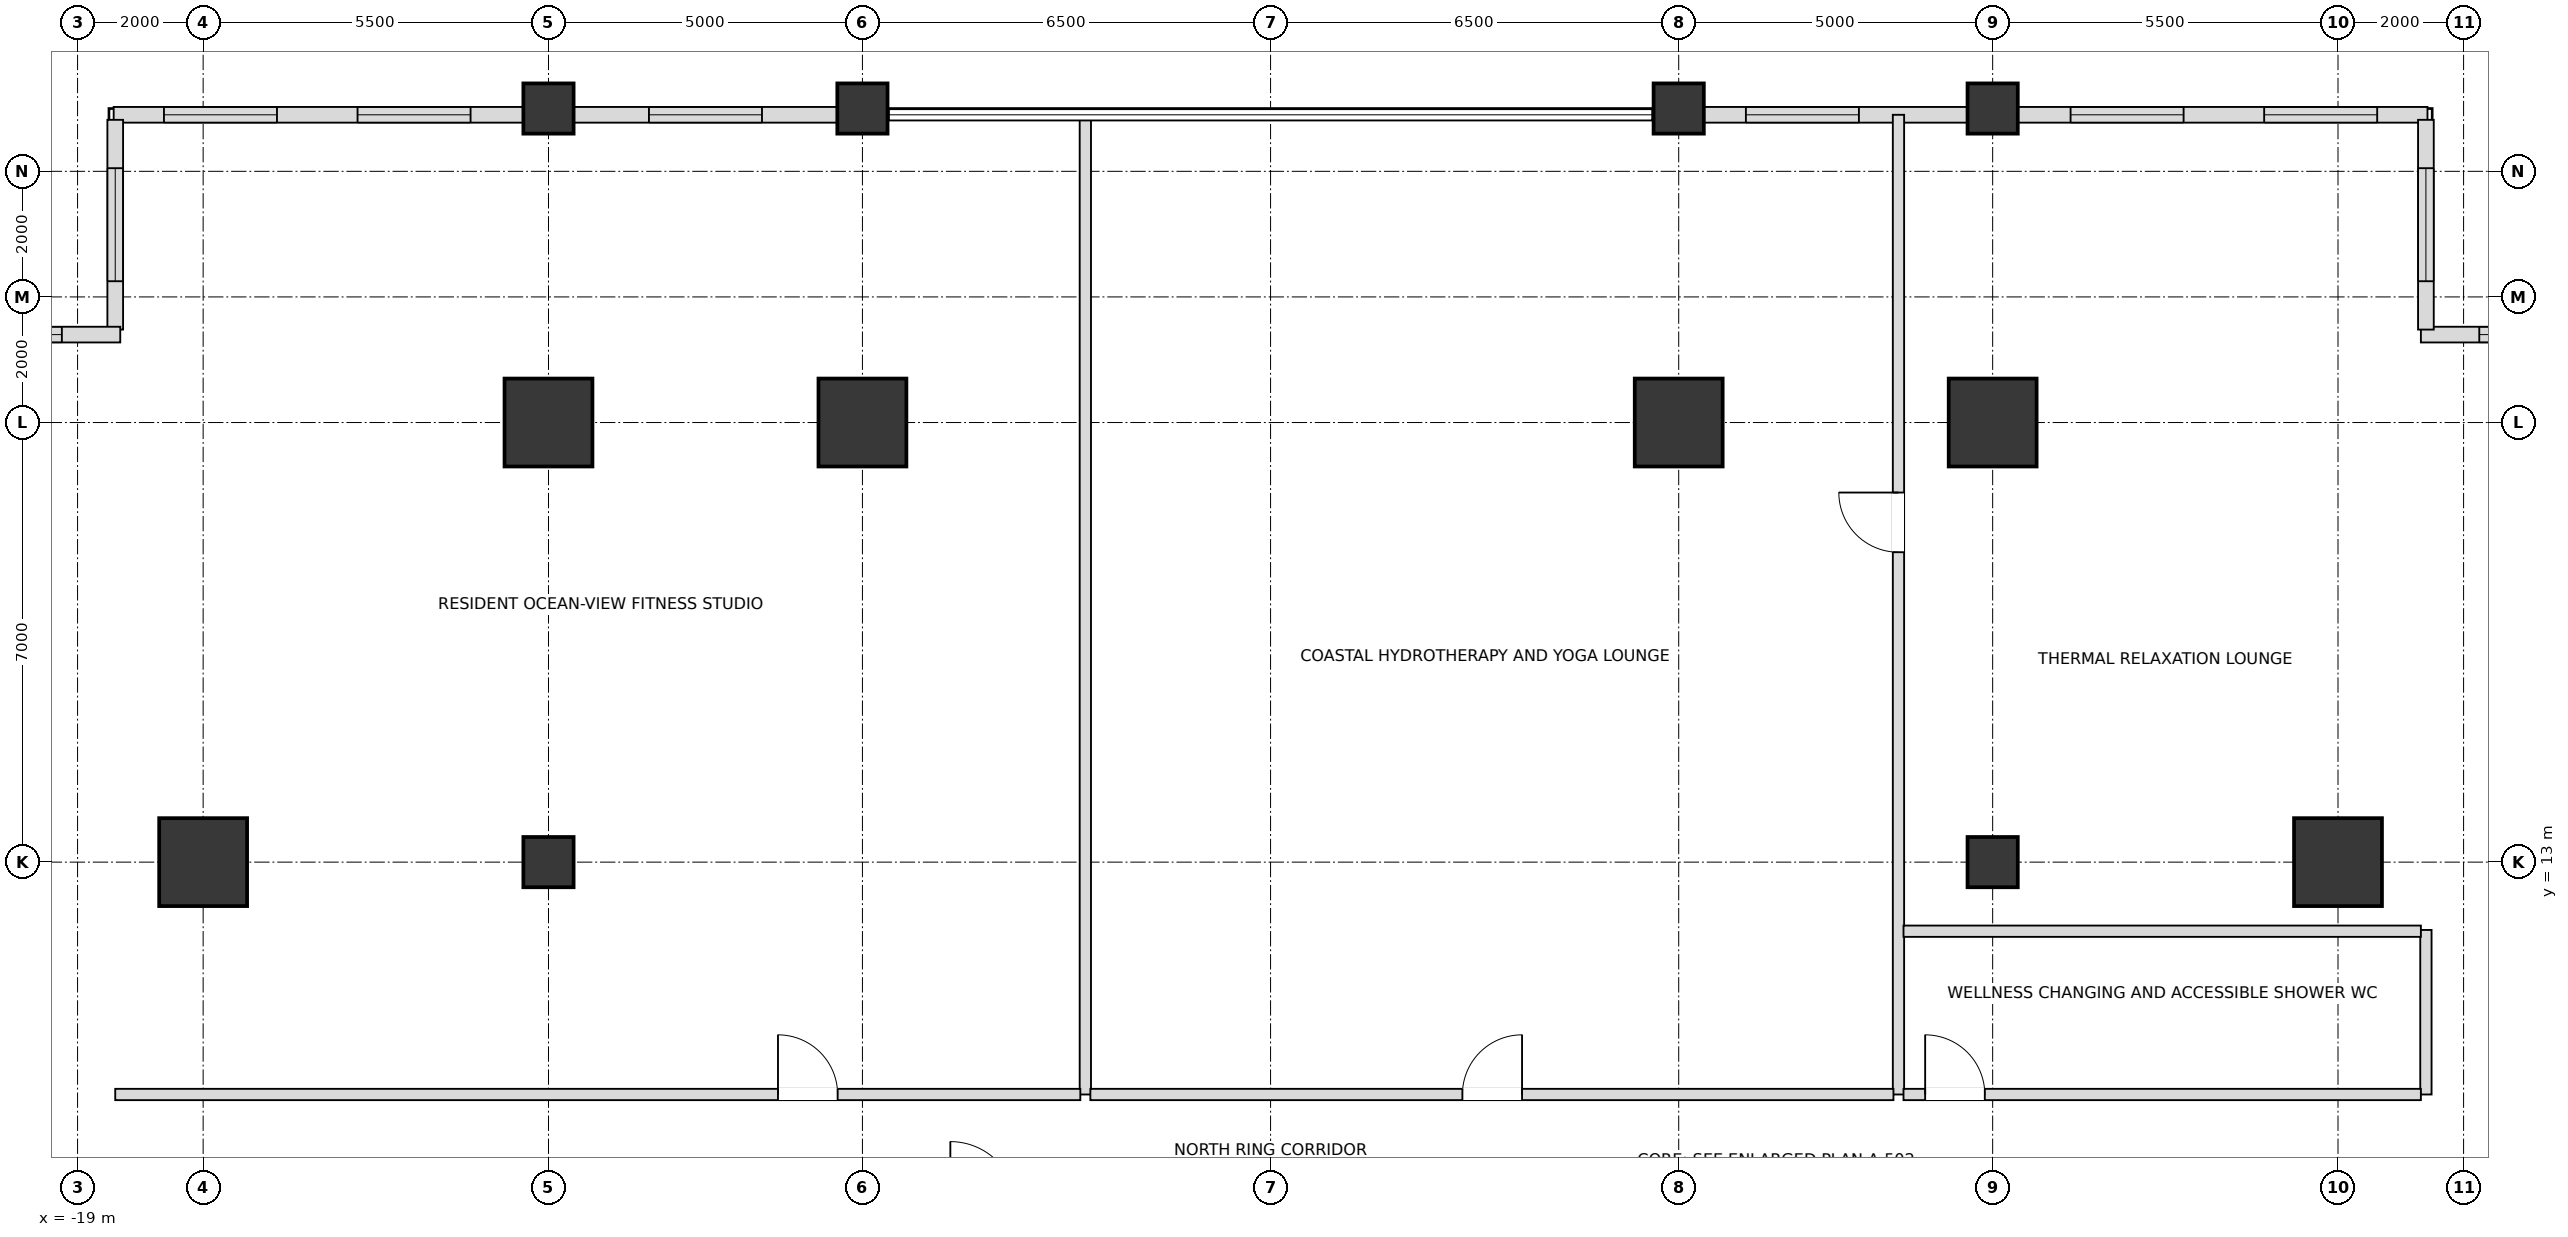
"""IFC4 building model, lengths in metres.
Left out: names, types, materials, properties, quantities, classifications, styles, units other than length and angle.
Written with IfcOpenShell. Run it as: python <this file> out.ifc"""

import sys

from ifc_helpers import new_model, si_unit, direction, frame, frame_2d, origin, origin_2d, place, context, subcontext, project, spatial, rectangle, extrude, element, fill, save


model = new_model("IFC4")
c1 = context("Model", 3, precision=1e-05, world=origin(), true_north=direction((0.0, 1.0)))
c2 = subcontext(c1, "Body", "Model", "MODEL_VIEW")
j1 = project(units=[si_unit("LENGTHUNIT", "METRE"), si_unit("PLANEANGLEUNIT", "RADIAN")], contexts=[c1])
p1 = place(None, origin())
s1 = spatial("IfcSite", under=j1, at=p1, CompositionType="ELEMENT")
p2 = place(p1, origin())
s2 = spatial("IfcBuilding", under=s1, at=p2, CompositionType="ELEMENT")
p3 = place(p2, frame((0.0, 0.0, 36.0)))
s3 = spatial("IfcBuildingStorey", under=s2, at=p3, CompositionType="ELEMENT", Elevation=36.0)
for number, where, z_axis, x_axis in (
    (1, (17.0, 13.0, 0.0), (0.0, 0.0, 1.0), (1.0, 0.0, 0.0)),
    (2, (11.5, 20.0, 0.0), (0.0, 0.0, 1.0), (1.0, 0.0, 0.0)),
    (3, (6.5, 20.0, 0.0), (0.0, 0.0, 1.0), (1.0, 0.0, 0.0)),
    (4, (-6.5, 20.0, 0.0), (0.0, 0.0, 1.0), (1.0, 0.0, 0.0)),
    (5, (-11.5, 20.0, 0.0), (0.0, 0.0, 1.0), (1.0, 0.0, 0.0)),
    (6, (-17.0, 13.0, 0.0), (0.0, 0.0, 1.0), (1.0, 0.0, 0.0)),
):
    element("IfcColumn", number, at=place(p3, frame(where, z_axis=z_axis, x_axis=x_axis)), inside=s3, PredefinedType="USERDEFINED", context=c2, shape_type="SweptSolid", body=[
        extrude(rectangle(XDim=1.4, YDim=1.4, at=origin_2d()), origin(), (0.0, 0.0, 1.0), 3.6),
    ])
for number, where, z_axis, x_axis in (
    (7, (-11.5, 13.0, 0.0), (0.0, 0.0, 1.0), (1.0, 0.0, 0.0)),
    (8, (11.5, 13.0, 0.0), (0.0, 0.0, 1.0), (1.0, 0.0, 0.0)),
    (9, (-11.5, 25.0, 0.0), (0.0, 0.0, 1.0), (1.0, 0.0, 0.0)),
    (10, (-6.5, 25.0, 0.0), (0.0, 0.0, 1.0), (1.0, 0.0, 0.0)),
    (11, (6.5, 25.0, 0.0), (0.0, 0.0, 1.0), (1.0, 0.0, 0.0)),
    (12, (11.5, 25.0, 0.0), (0.0, 0.0, 1.0), (1.0, 0.0, 0.0)),
):
    element("IfcColumn", number, at=place(p3, frame(where, z_axis=z_axis, x_axis=x_axis)), inside=s3, PredefinedType="COLUMN", context=c2, shape_type="SweptSolid", body=[
        extrude(rectangle(XDim=0.8, YDim=0.8, at=origin_2d()), origin(), (0.0, 0.0, 1.0), 3.6),
    ])
p4 = place(p3, frame((18.425, 24.9, 0.0), z_axis=(0.0, 0.0, 1.0), x_axis=(-1.0, 0.0, 0.0)))
e13 = element("IfcWall", 13, at=p4, inside=s3, PredefinedType="SOLIDWALL", context=c2, shape_type="SweptSolid", body=[
    extrude(rectangle(XDim=6.53, YDim=0.25, at=frame_2d((3.265, 0.0))), origin(), (0.0, 0.0, 1.0), 2.736),
])
p5 = place(p4, frame((0.801, 0.0, 0.72)))
e14 = element("IfcOpeningElement", 14, at=p5, cuts=e13, PredefinedType="OPENING", context=c2, shape_type="SweptSolid", body=[
    extrude(rectangle(XDim=1.8, YDim=1.68, at=frame_2d((0.9, 0.84))), frame((0.0, 0.135, 0.0), z_axis=(0.0, -1.0, 0.0), x_axis=(1.0, 0.0, 0.0)), (0.0, 0.0, 1.0), 0.27),
])
p6 = place(p4, frame((3.884, 0.0, 0.72)))
e15 = element("IfcOpeningElement", 15, at=p6, cuts=e13, PredefinedType="OPENING", context=c2, shape_type="SweptSolid", body=[
    extrude(rectangle(XDim=1.8, YDim=1.68, at=frame_2d((0.9, 0.84))), frame((0.0, 0.135, 0.0), z_axis=(0.0, -1.0, 0.0), x_axis=(1.0, 0.0, 0.0)), (0.0, 0.0, 1.0), 0.27),
])
p7 = place(p3, frame((11.105, 24.9, 0.0), z_axis=(0.0, 0.0, 1.0), x_axis=(-1.0, 0.0, 0.0)))
e16 = element("IfcWall", 16, at=p7, inside=s3, PredefinedType="SOLIDWALL", context=c2, shape_type="SweptSolid", body=[
    extrude(rectangle(XDim=4.21, YDim=0.25, at=frame_2d((2.105, 0.0))), origin(), (0.0, 0.0, 1.0), 2.736),
])
p8 = place(p7, frame((1.735, 0.0, 0.72)))
e17 = element("IfcOpeningElement", 17, at=p8, cuts=e16, PredefinedType="OPENING", context=c2, shape_type="SweptSolid", body=[
    extrude(rectangle(XDim=1.8, YDim=1.68, at=frame_2d((0.9, 0.84))), frame((0.0, 0.135, 0.0), z_axis=(0.0, -1.0, 0.0), x_axis=(1.0, 0.0, 0.0)), (0.0, 0.0, 1.0), 0.27),
])
p9 = place(p3, frame((-6.895, 24.9, 0.0), z_axis=(0.0, 0.0, 1.0), x_axis=(-1.0, 0.0, 0.0)))
e18 = element("IfcWall", 18, at=p9, inside=s3, PredefinedType="SOLIDWALL", context=c2, shape_type="SweptSolid", body=[
    extrude(rectangle(XDim=4.21, YDim=0.25, at=frame_2d((2.105, 0.0))), origin(), (0.0, 0.0, 1.0), 2.736),
])
p10 = place(p9, frame((1.205, 0.0, 0.72)))
e19 = element("IfcOpeningElement", 19, at=p10, cuts=e18, PredefinedType="OPENING", context=c2, shape_type="SweptSolid", body=[
    extrude(rectangle(XDim=1.8, YDim=1.68, at=frame_2d((0.9, 0.84))), frame((0.0, 0.135, 0.0), z_axis=(0.0, -1.0, 0.0), x_axis=(1.0, 0.0, 0.0)), (0.0, 0.0, 1.0), 0.27),
])
p11 = place(p3, frame((-11.895, 24.9, 0.0), z_axis=(0.0, 0.0, 1.0), x_axis=(-1.0, 0.0, 0.0)))
e20 = element("IfcWall", 20, at=p11, inside=s3, PredefinedType="SOLIDWALL", context=c2, shape_type="SweptSolid", body=[
    extrude(rectangle(XDim=6.53, YDim=0.25, at=frame_2d((3.265, 0.0))), origin(), (0.0, 0.0, 1.0), 2.736),
])
p12 = place(p11, frame((0.846, 0.0, 0.72)))
e21 = element("IfcOpeningElement", 21, at=p12, cuts=e20, PredefinedType="OPENING", context=c2, shape_type="SweptSolid", body=[
    extrude(rectangle(XDim=1.8, YDim=1.68, at=frame_2d((0.9, 0.84))), frame((0.0, 0.135, 0.0), z_axis=(0.0, -1.0, 0.0), x_axis=(1.0, 0.0, 0.0)), (0.0, 0.0, 1.0), 0.27),
])
p13 = place(p11, frame((3.929, 0.0, 0.72)))
e22 = element("IfcOpeningElement", 22, at=p13, cuts=e20, PredefinedType="OPENING", context=c2, shape_type="SweptSolid", body=[
    extrude(rectangle(XDim=1.8, YDim=1.68, at=frame_2d((0.9, 0.84))), frame((0.0, 0.135, 0.0), z_axis=(0.0, -1.0, 0.0), x_axis=(1.0, 0.0, 0.0)), (0.0, 0.0, 1.0), 0.27),
])
p14 = place(p3, frame((21.98, 21.4, 0.0), z_axis=(0.0, 0.0, 1.0), x_axis=(-1.0, 0.0, 0.0)))
e23 = element("IfcWall", 23, at=p14, inside=s3, PredefinedType="SOLIDWALL", context=c2, shape_type="SweptSolid", body=[
    extrude(rectangle(XDim=3.66, YDim=0.25, at=frame_2d((1.83, 0.0))), origin(), (0.0, 0.0, 1.0), 2.736),
])
p15 = place(p14, frame((0.93, 0.0, 0.72)))
e24 = element("IfcOpeningElement", 24, at=p15, cuts=e23, PredefinedType="OPENING", context=c2, shape_type="SweptSolid", body=[
    extrude(rectangle(XDim=1.8, YDim=1.68, at=frame_2d((0.9, 0.84))), frame((0.0, 0.135, 0.0), z_axis=(0.0, -1.0, 0.0), x_axis=(1.0, 0.0, 0.0)), (0.0, 0.0, 1.0), 0.27),
])
p16 = place(p3, frame((18.4, 21.48, 0.0), z_axis=(0.0, 0.0, 1.0), x_axis=(0.0, 1.0, 0.0)))
e25 = element("IfcWall", 25, at=p16, inside=s3, PredefinedType="SOLIDWALL", context=c2, shape_type="SweptSolid", body=[
    extrude(rectangle(XDim=3.34, YDim=0.25, at=frame_2d((1.67, 0.0))), origin(), (0.0, 0.0, 1.0), 2.736),
])
p17 = place(p16, frame((0.77, 0.0, 0.72)))
e26 = element("IfcOpeningElement", 26, at=p17, cuts=e25, PredefinedType="OPENING", context=c2, shape_type="SweptSolid", body=[
    extrude(rectangle(XDim=1.8, YDim=1.68, at=frame_2d((0.9, 0.84))), frame((0.0, 0.135, 0.0), z_axis=(0.0, -1.0, 0.0), x_axis=(1.0, 0.0, 0.0)), (0.0, 0.0, 1.0), 0.27),
])
p18 = place(p3, frame((-18.4, 24.82, 0.0), z_axis=(0.0, 0.0, 1.0), x_axis=(0.0, -1.0, 0.0)))
e27 = element("IfcWall", 27, at=p18, inside=s3, PredefinedType="SOLIDWALL", context=c2, shape_type="SweptSolid", body=[
    extrude(rectangle(XDim=3.34, YDim=0.25, at=frame_2d((1.67, 0.0))), origin(), (0.0, 0.0, 1.0), 2.736),
])
p19 = place(p18, frame((0.77, 0.0, 0.72)))
e28 = element("IfcOpeningElement", 28, at=p19, cuts=e27, PredefinedType="OPENING", context=c2, shape_type="SweptSolid", body=[
    extrude(rectangle(XDim=1.8, YDim=1.68, at=frame_2d((0.9, 0.84))), frame((0.0, 0.135, 0.0), z_axis=(0.0, -1.0, 0.0), x_axis=(1.0, 0.0, 0.0)), (0.0, 0.0, 1.0), 0.27),
])
p20 = place(p3, frame((-18.32, 21.4, 0.0), z_axis=(0.0, 0.0, 1.0), x_axis=(-1.0, 0.0, 0.0)))
e29 = element("IfcWall", 29, at=p20, inside=s3, PredefinedType="SOLIDWALL", context=c2, shape_type="SweptSolid", body=[
    extrude(rectangle(XDim=3.66, YDim=0.25, at=frame_2d((1.83, 0.0))), origin(), (0.0, 0.0, 1.0), 2.736),
])
p21 = place(p20, frame((0.93, 0.0, 0.72)))
e30 = element("IfcOpeningElement", 30, at=p21, cuts=e29, PredefinedType="OPENING", context=c2, shape_type="SweptSolid", body=[
    extrude(rectangle(XDim=1.8, YDim=1.68, at=frame_2d((0.9, 0.84))), frame((0.0, 0.135, 0.0), z_axis=(0.0, -1.0, 0.0), x_axis=(1.0, 0.0, 0.0)), (0.0, 0.0, 1.0), 0.27),
])
p22 = place(p3, frame((-2.95, 9.3, 0.0), z_axis=(0.0, 0.0, 1.0), x_axis=(0.0, 1.0, 0.0)))
e31 = element("IfcWall", 31, at=p22, inside=s3, PredefinedType="PARTITIONING", context=c2, shape_type="SweptSolid", body=[
    extrude(rectangle(XDim=15.6, YDim=0.18, at=frame_2d((7.8, 0.0))), origin(), (0.0, 0.0, 1.0), 2.816),
])
p23 = place(p3, frame((10.0, 9.3, 0.0), z_axis=(0.0, 0.0, 1.0), x_axis=(0.0, 1.0, 0.0)))
e32 = element("IfcWall", 32, at=p23, inside=s3, PredefinedType="PARTITIONING", context=c2, shape_type="SweptSolid", body=[
    extrude(rectangle(XDim=15.6, YDim=0.18, at=frame_2d((7.8, 0.0))), origin(), (0.0, 0.0, 1.0), 2.816),
])
p24 = place(p23, frame((8.635, 0.0, 0.0)))
e33 = element("IfcOpeningElement", 33, at=p24, cuts=e32, PredefinedType="OPENING", context=c2, shape_type="SweptSolid", body=[
    extrude(rectangle(XDim=0.95, YDim=2.15, at=frame_2d((0.475, 1.075))), frame((0.0, 0.1, 0.0), z_axis=(0.0, -1.0, 0.0), x_axis=(1.0, 0.0, 0.0)), (0.0, 0.0, 1.0), 0.2),
])
p25 = place(p3, frame((18.4, 9.3, 0.0), z_axis=(0.0, 0.0, 1.0), x_axis=(0.0, 1.0, 0.0)))
e34 = element("IfcWall", 34, at=p25, inside=s3, PredefinedType="PARTITIONING", context=c2, shape_type="SweptSolid", body=[
    extrude(rectangle(XDim=2.62, YDim=0.18, at=frame_2d((1.31, 0.0))), origin(), (0.0, 0.0, 1.0), 3.38),
])
p26 = place(p3, frame((-18.4, 9.3, 0.0), z_axis=(0.0, 0.0, 1.0), x_axis=(1.0, 0.0, 0.0)))
e35 = element("IfcWall", 35, at=p26, inside=s3, PredefinedType="PARTITIONING", context=c2, shape_type="SweptSolid", body=[
    extrude(rectangle(XDim=15.37, YDim=0.18, at=frame_2d((7.685, 0.0))), origin(), (0.0, 0.0, 1.0), 2.816),
])
p27 = place(p26, frame((10.555, 0.0, 0.0)))
e36 = element("IfcOpeningElement", 36, at=p27, cuts=e35, PredefinedType="OPENING", context=c2, shape_type="SweptSolid", body=[
    extrude(rectangle(XDim=0.95, YDim=2.15, at=frame_2d((0.475, 1.075))), frame((0.0, 0.1, 0.0), z_axis=(0.0, -1.0, 0.0), x_axis=(1.0, 0.0, 0.0)), (0.0, 0.0, 1.0), 0.2),
])
p28 = place(p3, frame((-2.87, 9.3, 0.0), z_axis=(0.0, 0.0, 1.0), x_axis=(1.0, 0.0, 0.0)))
e37 = element("IfcWall", 37, at=p28, inside=s3, PredefinedType="PARTITIONING", context=c2, shape_type="SweptSolid", body=[
    extrude(rectangle(XDim=12.79, YDim=0.18, at=frame_2d((6.395, 0.0))), origin(), (0.0, 0.0, 1.0), 2.816),
])
p29 = place(p28, frame((5.925, 0.0, 0.0)))
e38 = element("IfcOpeningElement", 38, at=p29, cuts=e37, PredefinedType="OPENING", context=c2, shape_type="SweptSolid", body=[
    extrude(rectangle(XDim=0.95, YDim=2.15, at=frame_2d((0.475, 1.075))), frame((0.0, 0.1, 0.0), z_axis=(0.0, -1.0, 0.0), x_axis=(1.0, 0.0, 0.0)), (0.0, 0.0, 1.0), 0.2),
])
p30 = place(p3, frame((10.08, 9.3, 0.0), z_axis=(0.0, 0.0, 1.0), x_axis=(1.0, 0.0, 0.0)))
e39 = element("IfcWall", 39, at=p30, inside=s3, PredefinedType="PARTITIONING", context=c2, shape_type="SweptSolid", body=[
    extrude(rectangle(XDim=8.24, YDim=0.18, at=frame_2d((4.12, 0.0))), origin(), (0.0, 0.0, 1.0), 2.816),
])
p31 = place(p30, frame((0.345, 0.0, 0.0)))
e40 = element("IfcOpeningElement", 40, at=p31, cuts=e39, PredefinedType="OPENING", context=c2, shape_type="SweptSolid", body=[
    extrude(rectangle(XDim=0.95, YDim=2.15, at=frame_2d((0.475, 1.075))), frame((0.0, 0.1, 0.0), z_axis=(0.0, -1.0, 0.0), x_axis=(1.0, 0.0, 0.0)), (0.0, 0.0, 1.0), 0.2),
])
p32 = place(p3, frame((10.08, 11.9, 0.0), z_axis=(0.0, 0.0, 1.0), x_axis=(1.0, 0.0, 0.0)))
e41 = element("IfcWall", 41, at=p32, inside=s3, PredefinedType="PARTITIONING", context=c2, shape_type="SweptSolid", body=[
    extrude(rectangle(XDim=8.24, YDim=0.18, at=frame_2d((4.12, 0.0))), origin(), (0.0, 0.0, 1.0), 2.816),
])
p33 = place(p5, origin())
e42 = element("IfcWindow", 42, at=p33, inside=s3, PartitioningType="SINGLE_PANEL", PredefinedType="WINDOW", context=c2, shape_type="SweptSolid", body=[
    extrude(rectangle(XDim=1.8, YDim=1.68, at=frame_2d((0.9, 0.84))), frame((0.0, 0.03, 0.0), z_axis=(0.0, -1.0, 0.0), x_axis=(1.0, 0.0, 0.0)), (0.0, 0.0, 1.0), 0.06),
])
fill(e14, e42)
p34 = place(p6, origin())
e43 = element("IfcWindow", 43, at=p34, inside=s3, PartitioningType="SINGLE_PANEL", PredefinedType="WINDOW", context=c2, shape_type="SweptSolid", body=[
    extrude(rectangle(XDim=1.8, YDim=1.68, at=frame_2d((0.9, 0.84))), frame((0.0, 0.03, 0.0), z_axis=(0.0, -1.0, 0.0), x_axis=(1.0, 0.0, 0.0)), (0.0, 0.0, 1.0), 0.06),
])
fill(e15, e43)
p35 = place(p8, origin())
e44 = element("IfcWindow", 44, at=p35, inside=s3, PartitioningType="SINGLE_PANEL", PredefinedType="WINDOW", context=c2, shape_type="SweptSolid", body=[
    extrude(rectangle(XDim=1.8, YDim=1.68, at=frame_2d((0.9, 0.84))), frame((0.0, 0.03, 0.0), z_axis=(0.0, -1.0, 0.0), x_axis=(1.0, 0.0, 0.0)), (0.0, 0.0, 1.0), 0.06),
])
fill(e17, e44)
p36 = place(p10, origin())
e45 = element("IfcWindow", 45, at=p36, inside=s3, PartitioningType="SINGLE_PANEL", PredefinedType="WINDOW", context=c2, shape_type="SweptSolid", body=[
    extrude(rectangle(XDim=1.8, YDim=1.68, at=frame_2d((0.9, 0.84))), frame((0.0, 0.03, 0.0), z_axis=(0.0, -1.0, 0.0), x_axis=(1.0, 0.0, 0.0)), (0.0, 0.0, 1.0), 0.06),
])
fill(e19, e45)
p37 = place(p12, origin())
e46 = element("IfcWindow", 46, at=p37, inside=s3, PartitioningType="SINGLE_PANEL", PredefinedType="WINDOW", context=c2, shape_type="SweptSolid", body=[
    extrude(rectangle(XDim=1.8, YDim=1.68, at=frame_2d((0.9, 0.84))), frame((0.0, 0.03, 0.0), z_axis=(0.0, -1.0, 0.0), x_axis=(1.0, 0.0, 0.0)), (0.0, 0.0, 1.0), 0.06),
])
fill(e21, e46)
p38 = place(p13, origin())
e47 = element("IfcWindow", 47, at=p38, inside=s3, PartitioningType="SINGLE_PANEL", PredefinedType="WINDOW", context=c2, shape_type="SweptSolid", body=[
    extrude(rectangle(XDim=1.8, YDim=1.68, at=frame_2d((0.9, 0.84))), frame((0.0, 0.03, 0.0), z_axis=(0.0, -1.0, 0.0), x_axis=(1.0, 0.0, 0.0)), (0.0, 0.0, 1.0), 0.06),
])
fill(e22, e47)
p39 = place(p15, origin())
e48 = element("IfcWindow", 48, at=p39, inside=s3, PartitioningType="SINGLE_PANEL", PredefinedType="WINDOW", context=c2, shape_type="SweptSolid", body=[
    extrude(rectangle(XDim=1.8, YDim=1.68, at=frame_2d((0.9, 0.84))), frame((0.0, 0.03, 0.0), z_axis=(0.0, -1.0, 0.0), x_axis=(1.0, 0.0, 0.0)), (0.0, 0.0, 1.0), 0.06),
])
fill(e24, e48)
p40 = place(p17, origin())
e49 = element("IfcWindow", 49, at=p40, inside=s3, PartitioningType="SINGLE_PANEL", PredefinedType="WINDOW", context=c2, shape_type="SweptSolid", body=[
    extrude(rectangle(XDim=1.8, YDim=1.68, at=frame_2d((0.9, 0.84))), frame((0.0, 0.03, 0.0), z_axis=(0.0, -1.0, 0.0), x_axis=(1.0, 0.0, 0.0)), (0.0, 0.0, 1.0), 0.06),
])
fill(e26, e49)
p41 = place(p19, origin())
e50 = element("IfcWindow", 50, at=p41, inside=s3, PartitioningType="SINGLE_PANEL", PredefinedType="WINDOW", context=c2, shape_type="SweptSolid", body=[
    extrude(rectangle(XDim=1.8, YDim=1.68, at=frame_2d((0.9, 0.84))), frame((0.0, 0.03, 0.0), z_axis=(0.0, -1.0, 0.0), x_axis=(1.0, 0.0, 0.0)), (0.0, 0.0, 1.0), 0.06),
])
fill(e28, e50)
p42 = place(p21, origin())
e51 = element("IfcWindow", 51, at=p42, inside=s3, PartitioningType="SINGLE_PANEL", PredefinedType="WINDOW", context=c2, shape_type="SweptSolid", body=[
    extrude(rectangle(XDim=1.8, YDim=1.68, at=frame_2d((0.9, 0.84))), frame((0.0, 0.03, 0.0), z_axis=(0.0, -1.0, 0.0), x_axis=(1.0, 0.0, 0.0)), (0.0, 0.0, 1.0), 0.06),
])
fill(e30, e51)
p43 = place(p31, origin())
e52 = element("IfcDoor", 52, at=p43, inside=s3, OperationType="SINGLE_SWING_LEFT", PredefinedType="DOOR", context=c2, shape_type="SweptSolid", body=[
    extrude(rectangle(XDim=0.95, YDim=2.15, at=frame_2d((0.475, 1.075))), frame((0.0, 0.025, 0.0), z_axis=(0.0, -1.0, 0.0), x_axis=(1.0, 0.0, 0.0)), (0.0, 0.0, 1.0), 0.05),
])
fill(e40, e52)
p44 = place(p24, origin())
e53 = element("IfcDoor", 53, at=p44, inside=s3, OperationType="SINGLE_SWING_RIGHT", PredefinedType="DOOR", context=c2, shape_type="SweptSolid", body=[
    extrude(rectangle(XDim=0.95, YDim=2.15, at=frame_2d((0.475, 1.075))), frame((0.0, 0.025, 0.0), z_axis=(0.0, -1.0, 0.0), x_axis=(1.0, 0.0, 0.0)), (0.0, 0.0, 1.0), 0.05),
])
fill(e33, e53)
p45 = place(p27, origin())
e54 = element("IfcDoor", 54, at=p45, inside=s3, OperationType="SINGLE_SWING_LEFT", PredefinedType="DOOR", context=c2, shape_type="SweptSolid", body=[
    extrude(rectangle(XDim=0.95, YDim=2.15, at=frame_2d((0.475, 1.075))), frame((0.0, 0.025, 0.0), z_axis=(0.0, -1.0, 0.0), x_axis=(1.0, 0.0, 0.0)), (0.0, 0.0, 1.0), 0.05),
])
fill(e36, e54)
p46 = place(p29, origin())
e55 = element("IfcDoor", 55, at=p46, inside=s3, OperationType="SINGLE_SWING_RIGHT", PredefinedType="DOOR", context=c2, shape_type="SweptSolid", body=[
    extrude(rectangle(XDim=0.95, YDim=2.15, at=frame_2d((0.475, 1.075))), frame((0.0, 0.025, 0.0), z_axis=(0.0, -1.0, 0.0), x_axis=(1.0, 0.0, 0.0)), (0.0, 0.0, 1.0), 0.05),
])
fill(e38, e55)
save(model, sys.argv[1])
